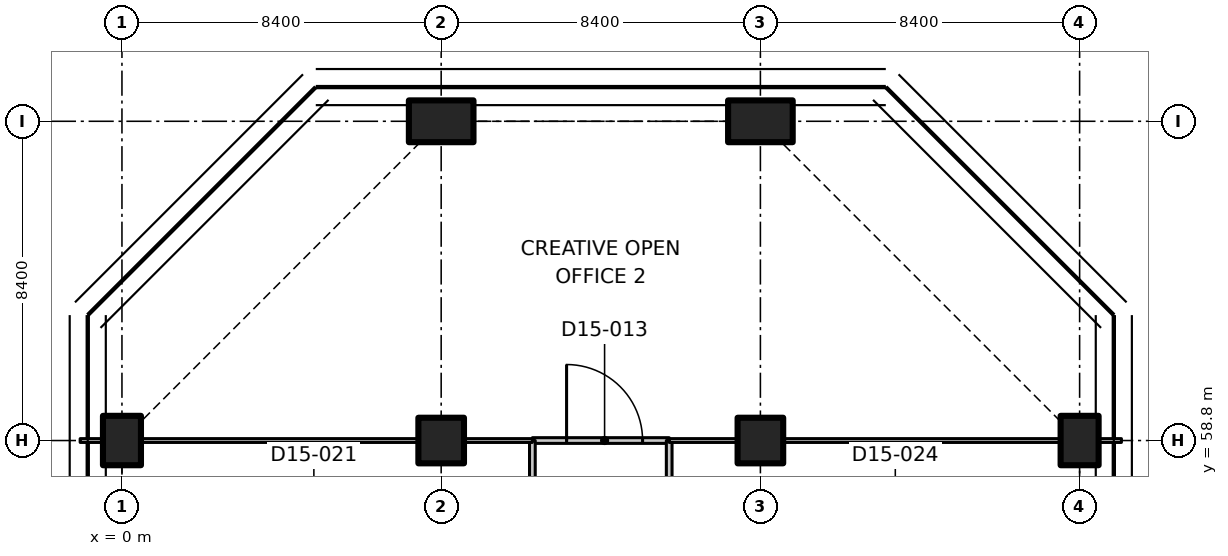
"""IFC4 building model, lengths in metres.
Left out: names, types, materials, properties, quantities, classifications, styles, units other than length and angle.
Written with IfcOpenShell. Run it as: python <this file> out.ifc"""

import sys

from ifc_helpers import new_model, si_unit, direction, frame, frame_2d, origin, origin_2d, place, context, subcontext, project, spatial, polyline, rectangle, outline, extrude, element, fill, save


model = new_model("IFC4")
c1 = context("Model", 3, precision=1e-05, world=origin(), true_north=direction((0.0, 1.0)))
c2 = subcontext(c1, "Body", "Model", "MODEL_VIEW")
j1 = project(units=[si_unit("LENGTHUNIT", "METRE"), si_unit("PLANEANGLEUNIT", "RADIAN")], contexts=[c1])
p1 = place(None, origin())
s1 = spatial("IfcSite", under=j1, at=p1, CompositionType="ELEMENT")
p2 = place(p1, origin())
s2 = spatial("IfcBuilding", under=s1, at=p2, CompositionType="ELEMENT")
p3 = place(p2, frame((0.0, 0.0, 113.3)))
s3 = spatial("IfcBuildingStorey", under=s2, at=p3, CompositionType="ELEMENT", Elevation=113.3)
p4 = place(p3, frame((0.0, 58.8, 0.0), z_axis=(0.0, 0.0, 1.0), x_axis=(1.0, 0.0, 0.0)))
e1 = element("IfcColumn", 1, at=p4, inside=s3, PredefinedType="COLUMN", context=c2, shape_type="SweptSolid", body=[
    extrude(rectangle(XDim=1.0, YDim=1.3, at=origin_2d()), origin(), (0.0, 0.0, 1.0), 3.35),
])
p5 = place(p3, frame((8.4, 58.8, 0.0), z_axis=(0.0, 0.0, 1.0), x_axis=(1.0, 0.0, 0.0)))
e2 = element("IfcColumn", 2, at=p5, inside=s3, PredefinedType="COLUMN", context=c2, shape_type="SweptSolid", body=[
    extrude(rectangle(XDim=1.2, YDim=1.2, at=origin_2d()), origin(), (0.0, 0.0, 1.0), 3.35),
])
p6 = place(p3, frame((8.4, 67.2, 0.0), z_axis=(0.0, 0.0, 1.0), x_axis=(0.0, 1.0, 0.0)))
e3 = element("IfcColumn", 3, at=p6, inside=s3, PredefinedType="COLUMN", context=c2, shape_type="SweptSolid", body=[
    extrude(rectangle(XDim=1.1, YDim=1.7, at=origin_2d()), origin(), (0.0, 0.0, 1.0), 3.35),
])
p7 = place(p3, frame((16.8, 58.8, 0.0), z_axis=(0.0, 0.0, 1.0), x_axis=(1.0, 0.0, 0.0)))
e4 = element("IfcColumn", 4, at=p7, inside=s3, PredefinedType="COLUMN", context=c2, shape_type="SweptSolid", body=[
    extrude(rectangle(XDim=1.2, YDim=1.2, at=origin_2d()), origin(), (0.0, 0.0, 1.0), 3.35),
])
p8 = place(p3, frame((16.8, 67.2, 0.0), z_axis=(0.0, 0.0, 1.0), x_axis=(0.0, 1.0, 0.0)))
e5 = element("IfcColumn", 5, at=p8, inside=s3, PredefinedType="COLUMN", context=c2, shape_type="SweptSolid", body=[
    extrude(rectangle(XDim=1.1, YDim=1.7, at=origin_2d()), origin(), (0.0, 0.0, 1.0), 3.35),
])
p9 = place(p3, frame((25.2, 58.8, 0.0), z_axis=(0.0, 0.0, 1.0), x_axis=(1.0, 0.0, 0.0)))
e6 = element("IfcColumn", 6, at=p9, inside=s3, PredefinedType="COLUMN", context=c2, shape_type="SweptSolid", body=[
    extrude(rectangle(XDim=1.0, YDim=1.3, at=origin_2d()), origin(), (0.0, 0.0, 1.0), 3.35),
])
p10 = place(p3, frame((10.8, 58.8, 0.0), z_axis=(0.0, 0.0, 1.0), x_axis=(1.0, 0.0, 0.0)))
e7 = element("IfcWall", 7, at=p10, inside=s3, PredefinedType="PARTITIONING", context=c2, shape_type="SweptSolid", body=[
    extrude(rectangle(XDim=3.6, YDim=0.15, at=frame_2d((1.8, 0.0))), origin(), (0.0, 0.0, 1.0), 3.33),
])
p11 = place(p10, frame((0.9, 0.0, 0.0)))
e8 = element("IfcOpeningElement", 8, at=p11, cuts=e7, PredefinedType="OPENING", context=c2, shape_type="SweptSolid", body=[
    extrude(rectangle(XDim=2.0, YDim=2.4, at=frame_2d((1.0, 1.2))), frame((0.0, 0.085, 0.0), z_axis=(0.0, -1.0, 0.0), x_axis=(1.0, 0.0, 0.0)), (0.0, 0.0, 1.0), 0.17),
])
for number, where, z_axis, x_axis in (
    (9, (10.8, 54.6, 0.0), (0.0, 0.0, 1.0), (0.0, 1.0, 0.0)),
    (10, (14.4, 58.8, 0.0), (0.0, 0.0, 1.0), (0.0, -1.0, 0.0)),
):
    element("IfcWall", number, at=place(p3, frame(where, z_axis=z_axis, x_axis=x_axis)), inside=s3, PredefinedType="PARTITIONING", context=c2, shape_type="SweptSolid", body=[
        extrude(rectangle(XDim=4.2, YDim=0.15, at=frame_2d((2.1, 0.0))), origin(), (0.0, 0.0, 1.0), 3.33),
    ])
p12 = place(p3, frame((10.8, 58.8, 0.0), z_axis=(0.0, 0.0, 1.0), x_axis=(-1.0, 0.0, 0.0)))
e11 = element("IfcWall", 11, at=p12, inside=s3, PredefinedType="PARTITIONING", context=c2, shape_type="SweptSolid", body=[
    extrude(rectangle(XDim=1.78, YDim=0.1, at=frame_2d((0.89, 0.0))), origin(), (0.0, 0.0, 1.0), 3.33),
])
p13 = place(p3, frame((7.78, 58.8, 0.0), z_axis=(0.0, 0.0, 1.0), x_axis=(-1.0, 0.0, 0.0)))
e12 = element("IfcWall", 12, at=p13, inside=s3, PredefinedType="PARTITIONING", context=c2, shape_type="SweptSolid", body=[
    extrude(outline(polyline([(0.0, 0.0), (7.26, 0.0), (7.26, 2.98), (7.116, 2.98), (7.114, 3.33), (0.0, 3.33), (0.0, 0.0)])), frame((0.0, 0.05, 0.0), z_axis=(0.0, -1.0, 0.0), x_axis=(1.0, 0.0, 0.0)), (0.0, 0.0, 1.0), 0.1),
])
for number, where, z_axis, x_axis in (
    (13, (-0.52, 58.8, 0.0), (0.0, 0.0, 1.0), (-1.0, 0.0, 0.0)),
    (14, (26.3, 58.8, 0.0), (0.0, 0.0, 1.0), (-1.0, 0.0, 0.0)),
):
    element("IfcWall", number, at=place(p3, frame(where, z_axis=z_axis, x_axis=x_axis)), inside=s3, PredefinedType="PARTITIONING", context=c2, shape_type="SweptSolid", body=[
        extrude(rectangle(XDim=0.58, YDim=0.1, at=frame_2d((0.29, 0.0))), origin(), (0.0, 0.0, 1.0), 3.33),
    ])
p14 = place(p3, frame((24.68, 58.8, 0.0), z_axis=(0.0, 0.0, 1.0), x_axis=(-1.0, 0.0, 0.0)))
e15 = element("IfcWall", 15, at=p14, inside=s3, PredefinedType="PARTITIONING", context=c2, shape_type="SweptSolid", body=[
    extrude(outline(polyline([(0.0, 0.0), (7.26, 0.0), (7.26, 3.33), (0.146, 3.33), (0.144, 2.98), (0.0, 2.98), (0.0, 0.0)])), frame((0.0, 0.05, 0.0), z_axis=(0.0, -1.0, 0.0), x_axis=(1.0, 0.0, 0.0)), (0.0, 0.0, 1.0), 0.1),
])
p15 = place(p3, frame((16.18, 58.8, 0.0), z_axis=(0.0, 0.0, 1.0), x_axis=(-1.0, 0.0, 0.0)))
e16 = element("IfcWall", 16, at=p15, inside=s3, PredefinedType="PARTITIONING", context=c2, shape_type="SweptSolid", body=[
    extrude(rectangle(XDim=1.78, YDim=0.1, at=frame_2d((0.89, 0.0))), origin(), (0.0, 0.0, 1.0), 3.33),
])
p16 = place(p11, origin())
e17 = element("IfcDoor", 17, at=p16, inside=s3, OperationType="DOUBLE_DOOR_SINGLE_SWING", PredefinedType="DOOR", context=c2, shape_type="SweptSolid", body=[
    extrude(rectangle(XDim=2.0, YDim=2.4, at=frame_2d((1.0, 1.2))), frame((0.0, 0.025, 0.0), z_axis=(0.0, -1.0, 0.0), x_axis=(1.0, 0.0, 0.0)), (0.0, 0.0, 1.0), 0.05),
])
fill(e8, e17)
save(model, sys.argv[1])
